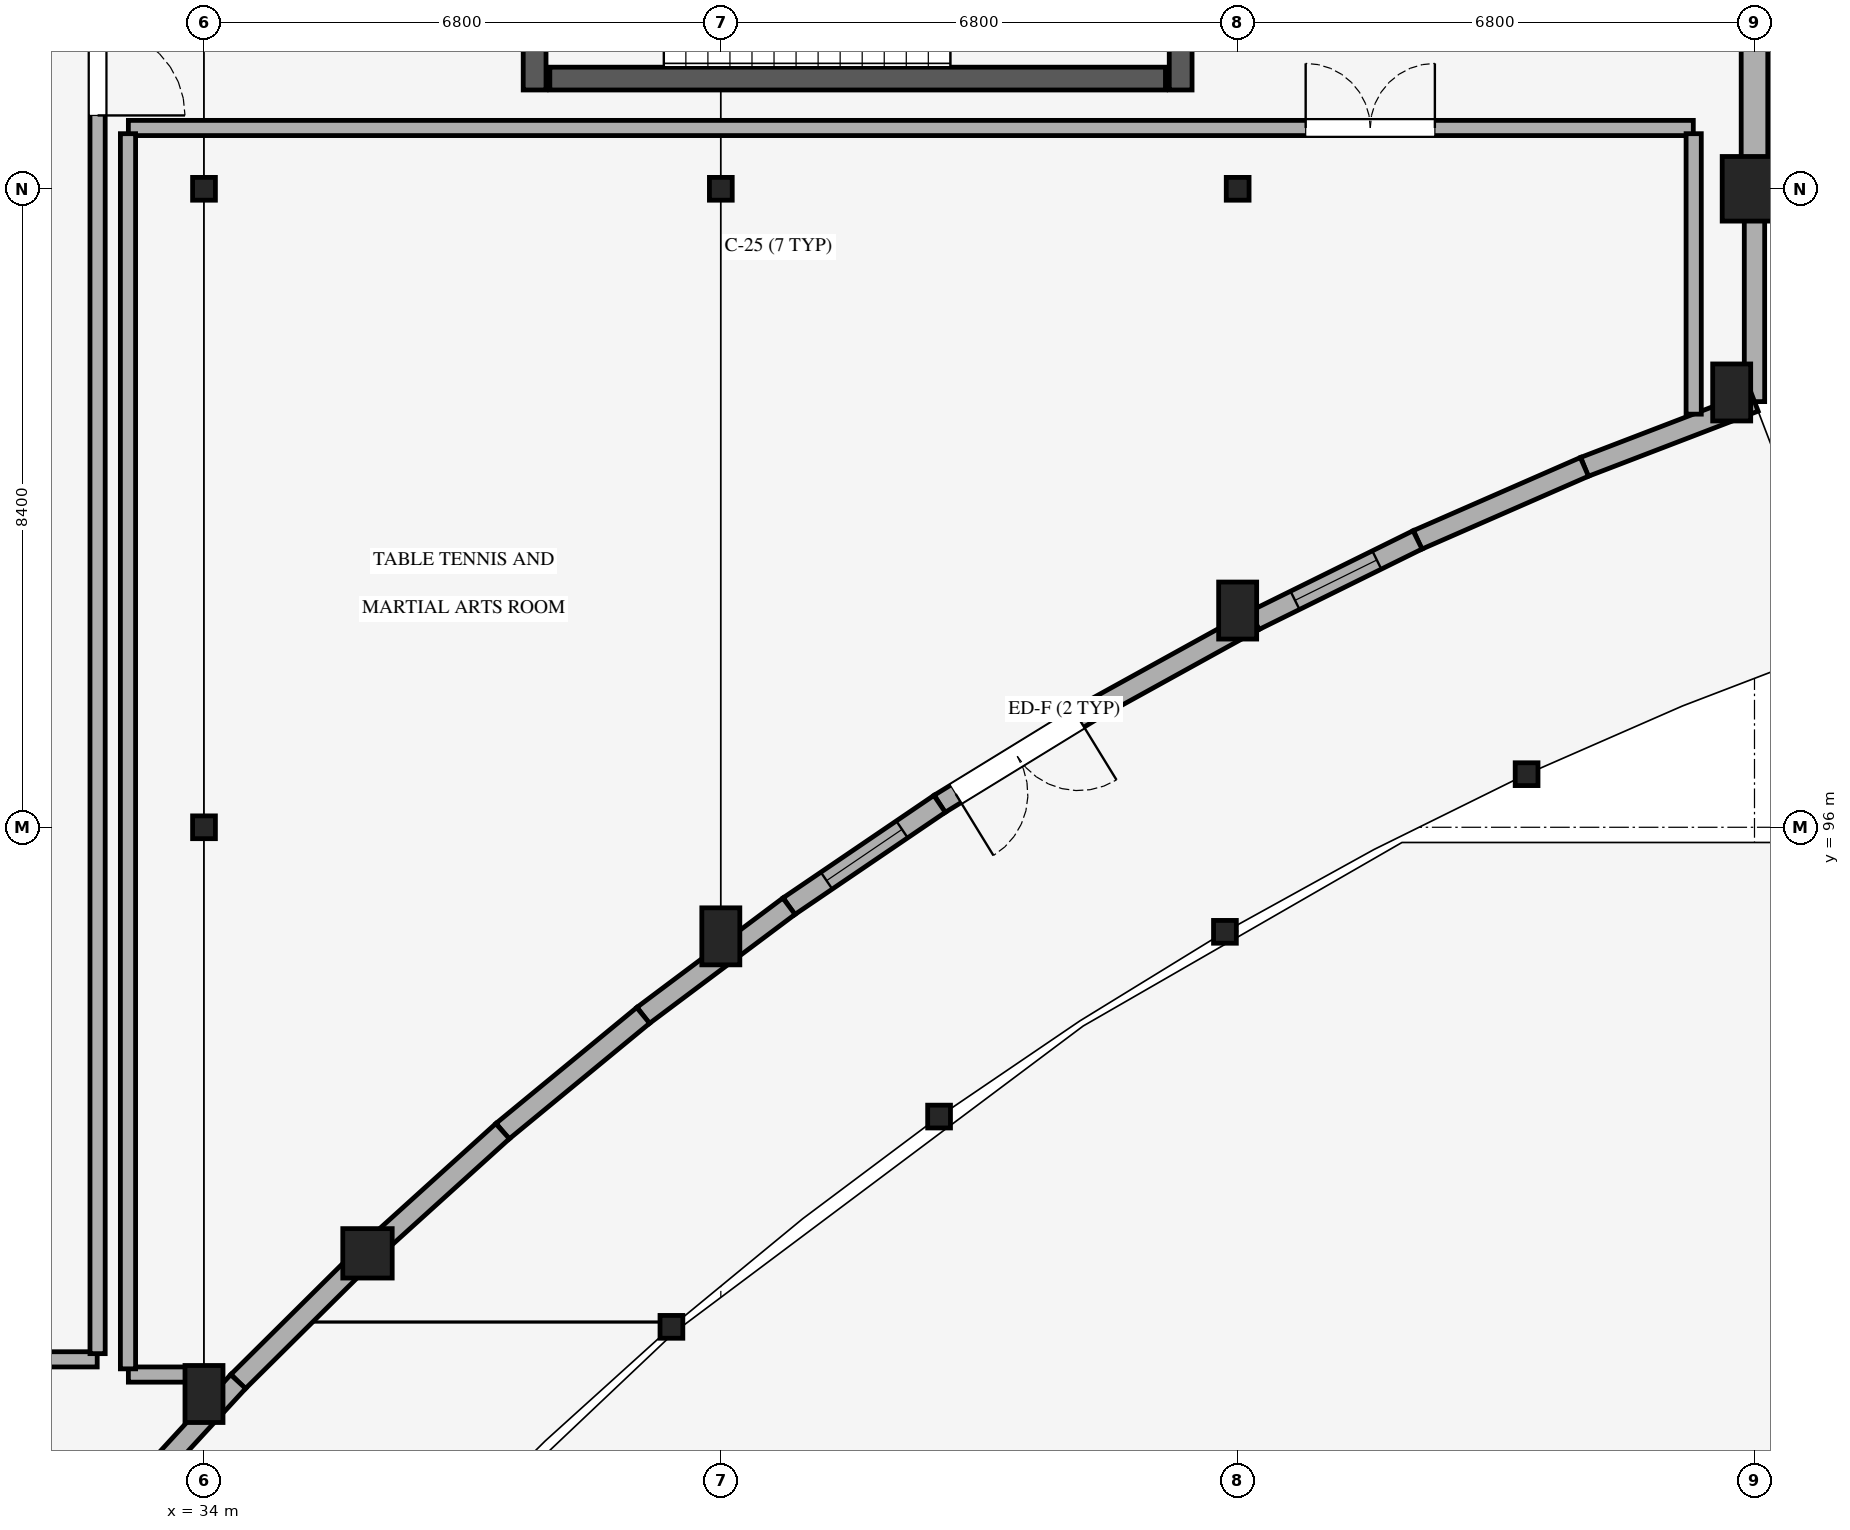
"""IFC4 building model, lengths in metres.
Left out: names, types, materials, properties, quantities, classifications, styles, units other than length and angle.
Written with IfcOpenShell. Run it as: python <this file> out.ifc"""

import sys

from ifc_helpers import new_model, si_unit, direction, frame, frame_2d, origin, origin_2d, place, context, subcontext, project, spatial, rectangle, hollow_rectangle, circle, i_section, extrude, element, fill, save


model = new_model("IFC4")
c1 = context("Model", 3, precision=1e-05, world=origin(), true_north=direction((0.0, 1.0)))
c2 = subcontext(c1, "Body", "Model", "MODEL_VIEW")
j1 = project(units=[si_unit("LENGTHUNIT", "METRE"), si_unit("PLANEANGLEUNIT", "RADIAN")], contexts=[c1])
p1 = place(None, origin())
s1 = spatial("IfcSite", under=j1, at=p1, CompositionType="ELEMENT")
p2 = place(p1, origin())
s2 = spatial("IfcBuilding", under=s1, at=p2, CompositionType="ELEMENT")
p3 = place(p2, origin())
s3 = spatial("IfcBuildingStorey", under=s2, at=p3, CompositionType="ELEMENT", Elevation=0.0)
p4 = place(p3, frame((34.0, 88.544, 0.0), z_axis=(0.0, 0.0, 1.0), x_axis=(1.0, 0.0, 0.0)))
e1 = element("IfcColumn", 1, at=p4, inside=s3, PredefinedType="COLUMN", context=c2, shape_type="SweptSolid", body=[
    extrude(rectangle(XDim=0.5, YDim=0.75, at=origin_2d()), origin(), (0.0, 0.0, 1.0), 4.8),
])
for number, where, z_axis, x_axis in (
    (2, (34.0, 96.0, 0.0), (0.0, 0.0, 1.0), (1.0, 0.0, 0.0)),
    (3, (34.0, 104.4, 0.0), (0.0, 0.0, 1.0), (1.0, 0.0, 0.0)),
):
    element("IfcColumn", number, at=place(p3, frame(where, z_axis=z_axis, x_axis=x_axis)), inside=s3, PredefinedType="COLUMN", context=c2, shape_type="SweptSolid", body=[
        extrude(i_section(OverallWidth=0.3, OverallDepth=0.3, WebThickness=0.01, FlangeThickness=0.015, FilletRadius=0.013, at=origin_2d()), origin(), (0.0, 0.0, 1.0), 4.8),
    ])
p5 = place(p3, frame((36.151, 90.395, 0.0), z_axis=(0.0, 0.0, 1.0), x_axis=(1.0, 0.0, 0.0)))
e4 = element("IfcColumn", 4, at=p5, inside=s3, PredefinedType="COLUMN", context=c2, shape_type="SweptSolid", body=[
    extrude(circle(Radius=0.325, at=origin_2d()), origin(), (0.0, 0.0, 1.0), 4.8),
])
p6 = place(p3, frame((40.15, 89.428, 0.0), z_axis=(0.0, 0.0, 1.0), x_axis=(1.0, 0.0, 0.0)))
e5 = element("IfcColumn", 5, at=p6, inside=s3, PredefinedType="COLUMN", context=c2, shape_type="SweptSolid", body=[
    extrude(hollow_rectangle(XDim=0.3, YDim=0.3, WallThickness=0.013, InnerFilletRadius=0.013, OuterFilletRadius=0.026, at=origin_2d()), origin(), (0.0, 0.0, 1.0), 4.8),
])
p7 = place(p3, frame((40.8, 94.565, 0.0), z_axis=(0.0, 0.0, 1.0), x_axis=(1.0, 0.0, 0.0)))
e6 = element("IfcColumn", 6, at=p7, inside=s3, PredefinedType="COLUMN", context=c2, shape_type="SweptSolid", body=[
    extrude(rectangle(XDim=0.5, YDim=0.75, at=origin_2d()), origin(), (0.0, 0.0, 1.0), 4.8),
])
p8 = place(p3, frame((40.8, 104.4, 0.0), z_axis=(0.0, 0.0, 1.0), x_axis=(1.0, 0.0, 0.0)))
e7 = element("IfcColumn", 7, at=p8, inside=s3, PredefinedType="COLUMN", context=c2, shape_type="SweptSolid", body=[
    extrude(i_section(OverallWidth=0.3, OverallDepth=0.3, WebThickness=0.01, FlangeThickness=0.015, FilletRadius=0.013, at=origin_2d()), origin(), (0.0, 0.0, 1.0), 4.8),
])
for number, where, z_axis, x_axis in (
    (8, (43.671, 92.194, 0.0), (0.0, 0.0, 1.0), (1.0, 0.0, 0.0)),
    (9, (47.433, 94.625, 0.0), (0.0, 0.0, 1.0), (1.0, 0.0, 0.0)),
):
    element("IfcColumn", number, at=place(p3, frame(where, z_axis=z_axis, x_axis=x_axis)), inside=s3, PredefinedType="COLUMN", context=c2, shape_type="SweptSolid", body=[
        extrude(hollow_rectangle(XDim=0.3, YDim=0.3, WallThickness=0.013, InnerFilletRadius=0.013, OuterFilletRadius=0.026, at=origin_2d()), origin(), (0.0, 0.0, 1.0), 4.8),
    ])
p9 = place(p3, frame((47.6, 98.851, 0.0), z_axis=(0.0, 0.0, 1.0), x_axis=(1.0, 0.0, 0.0)))
e10 = element("IfcColumn", 10, at=p9, inside=s3, PredefinedType="COLUMN", context=c2, shape_type="SweptSolid", body=[
    extrude(rectangle(XDim=0.5, YDim=0.75, at=origin_2d()), origin(), (0.0, 0.0, 1.0), 4.8),
])
p10 = place(p3, frame((47.6, 104.4, 0.0), z_axis=(0.0, 0.0, 1.0), x_axis=(1.0, 0.0, 0.0)))
e11 = element("IfcColumn", 11, at=p10, inside=s3, PredefinedType="COLUMN", context=c2, shape_type="SweptSolid", body=[
    extrude(i_section(OverallWidth=0.3, OverallDepth=0.3, WebThickness=0.01, FlangeThickness=0.015, FilletRadius=0.013, at=origin_2d()), origin(), (0.0, 0.0, 1.0), 4.8),
])
p11 = place(p3, frame((51.402, 96.698, 0.0), z_axis=(0.0, 0.0, 1.0), x_axis=(1.0, 0.0, 0.0)))
e12 = element("IfcColumn", 12, at=p11, inside=s3, PredefinedType="COLUMN", context=c2, shape_type="SweptSolid", body=[
    extrude(hollow_rectangle(XDim=0.3, YDim=0.3, WallThickness=0.013, InnerFilletRadius=0.013, OuterFilletRadius=0.026, at=origin_2d()), origin(), (0.0, 0.0, 1.0), 4.8),
])
p12 = place(p3, frame((54.1, 101.72, 0.0), z_axis=(0.0, 0.0, 1.0), x_axis=(1.0, 0.0, 0.0)))
e13 = element("IfcColumn", 13, at=p12, inside=s3, PredefinedType="COLUMN", context=c2, shape_type="SweptSolid", body=[
    extrude(rectangle(XDim=0.5, YDim=0.75, at=origin_2d()), origin(), (0.0, 0.0, 1.0), 4.8),
])
p13 = place(p3, frame((54.4, 104.4, 0.0), z_axis=(0.0, 0.0, 1.0), x_axis=(1.0, 0.0, 0.0)))
e14 = element("IfcColumn", 14, at=p13, inside=s3, PredefinedType="COLUMN", context=c2, shape_type="SweptSolid", body=[
    extrude(rectangle(XDim=0.85, YDim=0.85, at=origin_2d()), origin(), (0.0, 0.0, 1.0), 4.8),
])
p14 = place(p3, frame((54.4, 111.6, 0.0), z_axis=(0.0, 0.0, 1.0), x_axis=(0.0, -1.0, 0.0)))
e15 = element("IfcWall", 15, at=p14, inside=s3, PredefinedType="STANDARD", context=c2, shape_type="SweptSolid", body=[
    extrude(rectangle(XDim=7.2, YDim=0.35, at=frame_2d((3.6, 0.0))), origin(), (0.0, 0.0, 1.0), 2.855),
])
p15 = place(p14, frame((2.6, 0.0, 0.0)))
e16 = element("IfcOpeningElement", 16, at=p15, cuts=e15, PredefinedType="OPENING", context=c2, shape_type="SweptSolid", body=[
    extrude(rectangle(XDim=2.0, YDim=2.4, at=frame_2d((1.0, 1.2))), frame((0.0, 0.185, 0.0), z_axis=(0.0, -1.0, 0.0), x_axis=(1.0, 0.0, 0.0)), (0.0, 0.0, 1.0), 0.37),
])
p16 = place(p3, frame((54.4, 104.4, 0.0), z_axis=(0.0, 0.0, 1.0), x_axis=(0.0, -1.0, 0.0)))
e17 = element("IfcWall", 17, at=p16, inside=s3, PredefinedType="STANDARD", context=c2, shape_type="SweptSolid", body=[
    extrude(rectangle(XDim=2.8, YDim=0.268, at=frame_2d((1.4, 0.0))), origin(), (0.0, 0.0, 1.0), 2.855),
])
for number, where, z_axis, x_axis in (
    (18, (54.4, 101.6, 0.0), (0.0, 0.0, 1.0), (-0.934, -0.358, 0.0)),
    (19, (52.163, 100.742, 0.0), (0.0, 0.0, 1.0), (-0.916, -0.401, 0.0)),
):
    element("IfcWall", number, at=place(p3, frame(where, z_axis=z_axis, x_axis=x_axis)), inside=s3, PredefinedType="STANDARD", context=c2, shape_type="SweptSolid", body=[
        extrude(rectangle(XDim=2.396, YDim=0.268, at=frame_2d((1.198, 0.0))), origin(), (0.0, 0.0, 1.0), 3.82),
    ])
p17 = place(p3, frame((49.967, 99.781, 0.0), z_axis=(0.0, 0.0, 1.0), x_axis=(-0.896737964663, -0.442561885764, 0.0)))
e20 = element("IfcWall", 20, at=p17, inside=s3, PredefinedType="STANDARD", context=c2, shape_type="SweptSolid", body=[
    extrude(rectangle(XDim=2.396, YDim=0.268, at=frame_2d((1.198, 0.0))), origin(), (0.0, 0.0, 1.0), 3.82),
])
p18 = place(p17, frame((0.598, 0.0, 0.9)))
e21 = element("IfcOpeningElement", 21, at=p18, cuts=e20, PredefinedType="OPENING", context=c2, shape_type="SweptSolid", body=[
    extrude(rectangle(XDim=1.2, YDim=1.8, at=frame_2d((0.6, 0.9))), frame((0.0, 0.144, 0.0), z_axis=(0.0, -1.0, 0.0), x_axis=(1.0, 0.0, 0.0)), (0.0, 0.0, 1.0), 0.288),
])
p19 = place(p3, frame((47.818, 98.721, 0.0), z_axis=(0.0, 0.0, 1.0), x_axis=(-0.875379974168, -0.483435518788, 0.0)))
e22 = element("IfcWall", 22, at=p19, inside=s3, PredefinedType="STANDARD", context=c2, shape_type="SweptSolid", body=[
    extrude(rectangle(XDim=2.396, YDim=0.268, at=frame_2d((1.198, 0.0))), origin(), (0.0, 0.0, 1.0), 3.82),
])
p20 = place(p3, frame((45.721, 97.562, 0.0), z_axis=(0.0, 0.0, 1.0), x_axis=(-0.852161661099, -0.523278609685, 0.0)))
e23 = element("IfcWall", 23, at=p20, inside=s3, PredefinedType="STANDARD", context=c2, shape_type="SweptSolid", body=[
    extrude(rectangle(XDim=2.396, YDim=0.268, at=frame_2d((1.198, 0.0))), origin(), (0.0, 0.0, 1.0), 3.82),
])
p21 = place(p20, frame((0.248, 0.0, 0.0)))
e24 = element("IfcOpeningElement", 24, at=p21, cuts=e23, PredefinedType="OPENING", context=c2, shape_type="SweptSolid", body=[
    extrude(rectangle(XDim=1.9, YDim=2.25, at=frame_2d((0.95, 1.125))), frame((0.0, 0.144, 0.0), z_axis=(0.0, -1.0, 0.0), x_axis=(1.0, 0.0, 0.0)), (0.0, 0.0, 1.0), 0.288),
])
p22 = place(p3, frame((43.679, 96.308, 0.0), z_axis=(0.0, 0.0, 1.0), x_axis=(-0.827159505426, -0.561967216644, 0.0)))
e25 = element("IfcWall", 25, at=p22, inside=s3, PredefinedType="STANDARD", context=c2, shape_type="SweptSolid", body=[
    extrude(rectangle(XDim=2.396, YDim=0.268, at=frame_2d((1.198, 0.0))), origin(), (0.0, 0.0, 1.0), 3.82),
])
p23 = place(p22, frame((0.598, 0.0, 0.9)))
e26 = element("IfcOpeningElement", 26, at=p23, cuts=e25, PredefinedType="OPENING", context=c2, shape_type="SweptSolid", body=[
    extrude(rectangle(XDim=1.2, YDim=1.8, at=frame_2d((0.6, 0.9))), frame((0.0, 0.144, 0.0), z_axis=(0.0, -1.0, 0.0), x_axis=(1.0, 0.0, 0.0)), (0.0, 0.0, 1.0), 0.288),
])
p24 = place(p3, frame((41.697, 94.962, 0.0), z_axis=(0.0, 0.0, 1.0), x_axis=(-0.800391059778, -0.599478232655, 0.0)))
e27 = element("IfcWall", 27, at=p24, inside=s3, PredefinedType="STANDARD", context=c2, shape_type="SweptSolid", body=[
    extrude(rectangle(XDim=2.396, YDim=0.268, at=frame_2d((1.198, 0.0))), origin(), (0.0, 0.0, 1.0), 3.82),
])
p25 = place(p3, frame((39.779, 93.525, 0.0), z_axis=(0.0, 0.0, 1.0), x_axis=(-0.771924354008, -0.635714394748, 0.0)))
e28 = element("IfcWall", 28, at=p25, inside=s3, PredefinedType="STANDARD", context=c2, shape_type="SweptSolid", body=[
    extrude(rectangle(XDim=2.396, YDim=0.268, at=frame_2d((1.198, 0.0))), origin(), (0.0, 0.0, 1.0), 3.82),
])
p26 = place(p3, frame((37.929, 92.002, 0.0), z_axis=(0.0, 0.0, 1.0), x_axis=(-0.741818117858, -0.670601133325, 0.0)))
e29 = element("IfcWall", 29, at=p26, inside=s3, PredefinedType="STANDARD", context=c2, shape_type="SweptSolid", body=[
    extrude(rectangle(XDim=2.396, YDim=0.268, at=frame_2d((1.198, 0.0))), origin(), (0.0, 0.0, 1.0), 3.82),
])
p27 = place(p3, frame((36.151, 90.395, 0.0), z_axis=(0.0, 0.0, 1.0), x_axis=(-0.710156803668, -0.704043545673, 0.0)))
e30 = element("IfcWall", 30, at=p27, inside=s3, PredefinedType="STANDARD", context=c2, shape_type="SweptSolid", body=[
    extrude(rectangle(XDim=2.396, YDim=0.268, at=frame_2d((1.198, 0.0))), origin(), (0.0, 0.0, 1.0), 3.62),
])
p28 = place(p3, frame((34.449, 88.708, 0.0), z_axis=(0.0, 0.0, 1.0), x_axis=(-0.676946175491, -0.73603252339, 0.0)))
e31 = element("IfcWall", 31, at=p28, inside=s3, PredefinedType="STANDARD", context=c2, shape_type="SweptSolid", body=[
    extrude(rectangle(XDim=2.396, YDim=0.268, at=frame_2d((1.198, 0.0))), origin(), (0.0, 0.0, 1.0), 3.62),
])
p29 = place(p3, frame((38.35, 109.6, 0.0), z_axis=(0.0, 0.0, 1.0), x_axis=(0.0, -1.0, 0.0)))
e32 = element("IfcWall", 32, at=p29, inside=s3, PredefinedType="SHEAR", context=c2, shape_type="SweptSolid", body=[
    extrude(rectangle(XDim=3.9, YDim=0.3, at=frame_2d((1.95, 0.0))), origin(), (0.0, 0.0, 1.0), 4.495),
])
p30 = place(p29, frame((1.325, 0.0, 0.0)))
e33 = element("IfcOpeningElement", 33, at=p30, cuts=e32, PredefinedType="OPENING", context=c2, shape_type="SweptSolid", body=[
    extrude(rectangle(XDim=1.25, YDim=2.2, at=frame_2d((0.625, 1.1))), frame((0.0, 0.16, 0.0), z_axis=(0.0, -1.0, 0.0), x_axis=(1.0, 0.0, 0.0)), (0.0, 0.0, 1.0), 0.32),
])
p31 = place(p3, frame((38.55, 105.85, 0.0), z_axis=(0.0, 0.0, 1.0), x_axis=(1.0, 0.0, 0.0)))
e34 = element("IfcWall", 34, at=p31, inside=s3, PredefinedType="SHEAR", context=c2, shape_type="SweptSolid", body=[
    extrude(rectangle(XDim=8.1, YDim=0.3, at=frame_2d((4.05, 0.0))), origin(), (0.0, 0.0, 1.0), 4.495),
])
p32 = place(p3, frame((46.85, 105.7, 0.0), z_axis=(0.0, 0.0, 1.0), x_axis=(0.0, 1.0, 0.0)))
e35 = element("IfcWall", 35, at=p32, inside=s3, PredefinedType="SHEAR", context=c2, shape_type="SweptSolid", body=[
    extrude(rectangle(XDim=3.9, YDim=0.3, at=frame_2d((1.95, 0.0))), origin(), (0.0, 0.0, 1.0), 4.495),
])
p33 = place(p3, frame((33.005, 105.2, 0.0), z_axis=(0.0, 0.0, 1.0), x_axis=(1.0, 0.0, 0.0)))
e36 = element("IfcWall", 36, at=p33, inside=s3, PredefinedType="STANDARD", context=c2, shape_type="SweptSolid", body=[
    extrude(rectangle(XDim=20.59, YDim=0.2, at=frame_2d((10.295, 0.0))), origin(), (0.0, 0.0, 1.0), 4.12),
])
p34 = place(p33, frame((15.49, 0.0, 0.0)))
e37 = element("IfcOpeningElement", 37, at=p34, cuts=e36, PredefinedType="OPENING", context=c2, shape_type="SweptSolid", body=[
    extrude(rectangle(XDim=1.7, YDim=2.3, at=frame_2d((0.85, 1.15))), frame((0.0, 0.11, 0.0), z_axis=(0.0, -1.0, 0.0), x_axis=(1.0, 0.0, 0.0)), (0.0, 0.0, 1.0), 0.22),
])
p35 = place(p3, frame((53.6, 105.125, 0.0), z_axis=(0.0, 0.0, 1.0), x_axis=(0.0, -1.0, 0.0)))
e38 = element("IfcWall", 38, at=p35, inside=s3, PredefinedType="STANDARD", context=c2, shape_type="SweptSolid", body=[
    extrude(rectangle(XDim=3.69, YDim=0.2, at=frame_2d((1.845, 0.0))), origin(), (0.0, 0.0, 1.0), 3.62),
])
p36 = place(p3, frame((34.203, 88.8, 0.0), z_axis=(0.0, 0.0, 1.0), x_axis=(-1.0, 0.0, 0.0)))
e39 = element("IfcWall", 39, at=p36, inside=s3, PredefinedType="STANDARD", context=c2, shape_type="SweptSolid", body=[
    extrude(rectangle(XDim=1.198, YDim=0.2, at=frame_2d((0.599, 0.0))), origin(), (0.0, 0.0, 1.0), 3.62),
])
p37 = place(p3, frame((33.0, 88.875, 0.0), z_axis=(0.0, 0.0, 1.0), x_axis=(0.0, 1.0, 0.0)))
e40 = element("IfcWall", 40, at=p37, inside=s3, PredefinedType="STANDARD", context=c2, shape_type="SweptSolid", body=[
    extrude(rectangle(XDim=16.25, YDim=0.2, at=frame_2d((8.125, 0.0))), origin(), (0.0, 0.0, 1.0), 4.49),
])
p38 = place(p3, frame((32.595, 89.0, 0.0), z_axis=(0.0, 0.0, 1.0), x_axis=(-1.0, 0.0, 0.0)))
e41 = element("IfcWall", 41, at=p38, inside=s3, PredefinedType="STANDARD", context=c2, shape_type="SweptSolid", body=[
    extrude(rectangle(XDim=22.19, YDim=0.2, at=frame_2d((11.095, 0.0))), origin(), (0.0, 0.0, 1.0), 4.49),
])
p39 = place(p38, frame((9.425, 0.0, 0.0)))
e42 = element("IfcOpeningElement", 42, at=p39, cuts=e41, PredefinedType="OPENING", context=c2, shape_type="SweptSolid", body=[
    extrude(rectangle(XDim=1.7, YDim=2.3, at=frame_2d((0.85, 1.15))), frame((0.0, 0.11, 0.0), z_axis=(0.0, -1.0, 0.0), x_axis=(1.0, 0.0, 0.0)), (0.0, 0.0, 1.0), 0.22),
])
p40 = place(p3, frame((32.6, 108.325, 0.0), z_axis=(0.0, 0.0, 1.0), x_axis=(0.0, -1.0, 0.0)))
e43 = element("IfcWall", 43, at=p40, inside=s3, PredefinedType="STANDARD", context=c2, shape_type="SweptSolid", body=[
    extrude(rectangle(XDim=19.25, YDim=0.2, at=frame_2d((9.625, 0.0))), origin(), (0.0, 0.0, 1.0), 4.49),
])
p41 = place(p40, frame((1.81, 0.0, 0.0)))
e44 = element("IfcOpeningElement", 44, at=p41, cuts=e43, PredefinedType="OPENING", context=c2, shape_type="SweptSolid", body=[
    extrude(rectangle(XDim=1.15, YDim=2.2, at=frame_2d((0.575, 1.1))), frame((0.0, 0.11, 0.0), z_axis=(0.0, -1.0, 0.0), x_axis=(1.0, 0.0, 0.0)), (0.0, 0.0, 1.0), 0.22),
])
p42 = place(p18, origin())
e45 = element("IfcWindow", 45, at=p42, inside=s3, PartitioningType="SINGLE_PANEL", PredefinedType="WINDOW", context=c2, shape_type="SweptSolid", body=[
    extrude(rectangle(XDim=1.2, YDim=1.8, at=frame_2d((0.6, 0.9))), frame((0.0, 0.03, 0.0), z_axis=(0.0, -1.0, 0.0), x_axis=(1.0, 0.0, 0.0)), (0.0, 0.0, 1.0), 0.06),
])
fill(e21, e45)
p43 = place(p23, origin())
e46 = element("IfcWindow", 46, at=p43, inside=s3, PartitioningType="SINGLE_PANEL", PredefinedType="WINDOW", context=c2, shape_type="SweptSolid", body=[
    extrude(rectangle(XDim=1.2, YDim=1.8, at=frame_2d((0.6, 0.9))), frame((0.0, 0.03, 0.0), z_axis=(0.0, -1.0, 0.0), x_axis=(1.0, 0.0, 0.0)), (0.0, 0.0, 1.0), 0.06),
])
fill(e26, e46)
p44 = place(p21, origin())
e47 = element("IfcDoor", 47, at=p44, inside=s3, OperationType="DOUBLE_DOOR_SINGLE_SWING", PredefinedType="DOOR", context=c2, shape_type="SweptSolid", body=[
    extrude(rectangle(XDim=1.9, YDim=2.25, at=frame_2d((0.95, 1.125))), frame((0.0, 0.025, 0.0), z_axis=(0.0, -1.0, 0.0), x_axis=(1.0, 0.0, 0.0)), (0.0, 0.0, 1.0), 0.05),
])
fill(e24, e47)
p45 = place(p34, origin())
e48 = element("IfcDoor", 48, at=p45, inside=s3, OperationType="DOUBLE_DOOR_SINGLE_SWING", PredefinedType="DOOR", context=c2, shape_type="SweptSolid", body=[
    extrude(rectangle(XDim=1.7, YDim=2.3, at=frame_2d((0.85, 1.15))), frame((0.0, 0.025, 0.0), z_axis=(0.0, -1.0, 0.0), x_axis=(1.0, 0.0, 0.0)), (0.0, 0.0, 1.0), 0.05),
])
fill(e37, e48)
p46 = place(p41, origin())
e49 = element("IfcDoor", 49, at=p46, inside=s3, OperationType="SINGLE_SWING_RIGHT", PredefinedType="DOOR", context=c2, shape_type="SweptSolid", body=[
    extrude(rectangle(XDim=1.15, YDim=2.2, at=frame_2d((0.575, 1.1))), frame((0.0, 0.025, 0.0), z_axis=(0.0, -1.0, 0.0), x_axis=(1.0, 0.0, 0.0)), (0.0, 0.0, 1.0), 0.05),
])
fill(e44, e49)
save(model, sys.argv[1])
